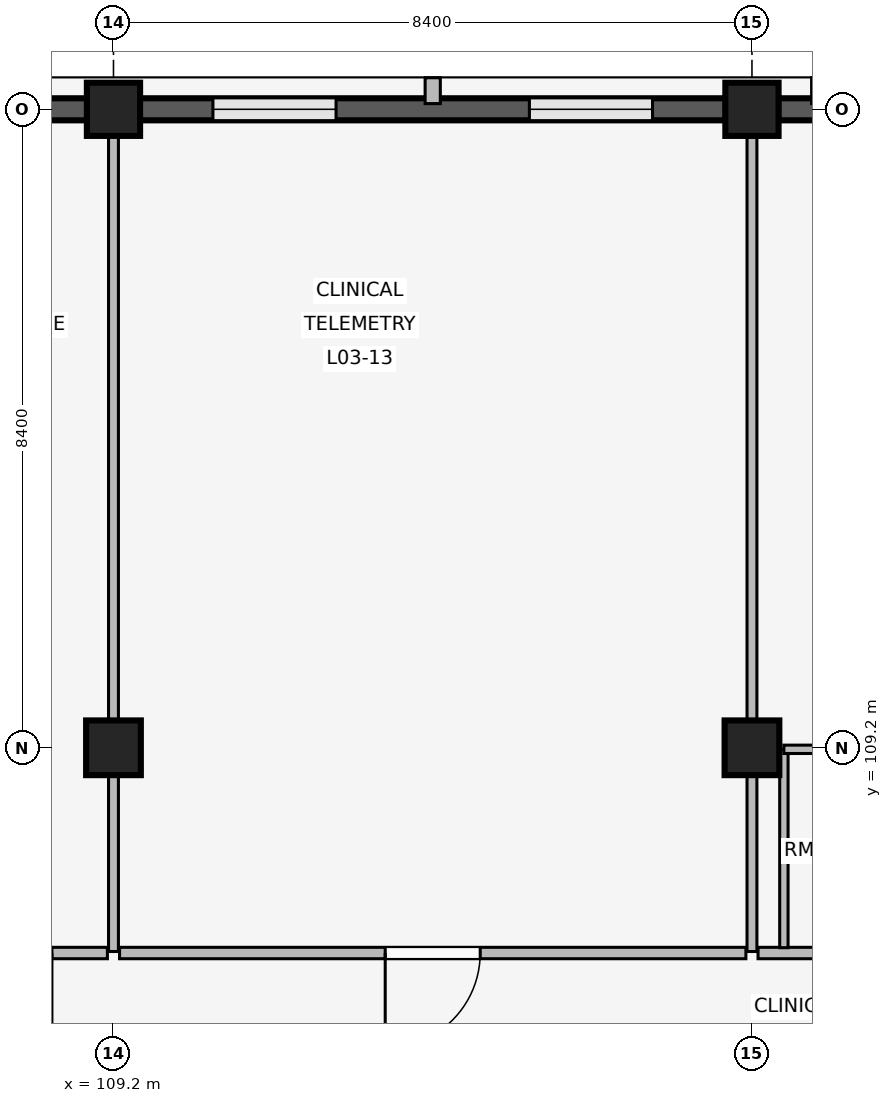
"""IFC4 building model, lengths in metres.
Left out: names, types, materials, properties, quantities, classifications, styles, units other than length and angle.
Written with IfcOpenShell. Run it as: python <this file> out.ifc"""

import sys

from ifc_helpers import new_model, si_unit, direction, frame, frame_2d, origin, origin_2d, place, context, subcontext, project, spatial, rectangle, extrude, element, fill, save


model = new_model("IFC4")
c1 = context("Model", 3, precision=1e-05, world=origin(), true_north=direction((0.0, 1.0)))
c2 = subcontext(c1, "Body", "Model", "MODEL_VIEW")
j1 = project(units=[si_unit("LENGTHUNIT", "METRE"), si_unit("PLANEANGLEUNIT", "RADIAN")], contexts=[c1])
p1 = place(None, origin())
s1 = spatial("IfcSite", under=j1, at=p1, CompositionType="ELEMENT")
p2 = place(p1, origin())
s2 = spatial("IfcBuilding", under=s1, at=p2, CompositionType="ELEMENT")
p3 = place(p2, frame((0.0, 0.0, 12.9)))
s3 = spatial("IfcBuildingStorey", under=s2, at=p3, CompositionType="ELEMENT", Elevation=12.9)
p4 = place(p3, frame((109.2, 109.2, 0.0), z_axis=(0.0, 0.0, 1.0), x_axis=(1.0, 0.0, 0.0)))
e1 = element("IfcColumn", 1, at=p4, inside=s3, PredefinedType="COLUMN", context=c2, shape_type="SweptSolid", body=[
    extrude(rectangle(XDim=0.72, YDim=0.72, at=origin_2d()), origin(), (0.0, 0.0, 1.0), 3.3),
])
p5 = place(p3, frame((109.2, 117.6, 0.0), z_axis=(0.0, 0.0, 1.0), x_axis=(1.0, 0.0, 0.0)))
e2 = element("IfcColumn", 2, at=p5, inside=s3, PredefinedType="COLUMN", context=c2, shape_type="SweptSolid", body=[
    extrude(rectangle(XDim=0.7, YDim=0.7, at=origin_2d()), origin(), (0.0, 0.0, 1.0), 3.3),
])
p6 = place(p3, frame((117.6, 109.2, 0.0), z_axis=(0.0, 0.0, 1.0), x_axis=(1.0, 0.0, 0.0)))
e3 = element("IfcColumn", 3, at=p6, inside=s3, PredefinedType="COLUMN", context=c2, shape_type="SweptSolid", body=[
    extrude(rectangle(XDim=0.72, YDim=0.72, at=origin_2d()), origin(), (0.0, 0.0, 1.0), 3.3),
])
p7 = place(p3, frame((117.6, 117.6, 0.0), z_axis=(0.0, 0.0, 1.0), x_axis=(1.0, 0.0, 0.0)))
e4 = element("IfcColumn", 4, at=p7, inside=s3, PredefinedType="COLUMN", context=c2, shape_type="SweptSolid", body=[
    extrude(rectangle(XDim=0.7, YDim=0.7, at=origin_2d()), origin(), (0.0, 0.0, 1.0), 3.3),
])
p8 = place(p3, frame((101.145, 117.6, 0.0), z_axis=(0.0, 0.0, 1.0), x_axis=(1.0, 0.0, 0.0)))
e5 = element("IfcWall", 5, at=p8, inside=s3, PredefinedType="SOLIDWALL", context=c2, shape_type="SweptSolid", body=[
    extrude(rectangle(XDim=7.71, YDim=0.29, at=frame_2d((3.855, 0.0))), origin(), (0.0, 0.0, 1.0), 2.44),
])
p9 = place(p8, frame((1.043, 0.0, 0.85)))
e6 = element("IfcOpeningElement", 6, at=p9, cuts=e5, PredefinedType="OPENING", context=c2, shape_type="SweptSolid", body=[
    extrude(rectangle(XDim=1.46, YDim=0.85, at=frame_2d((0.73, 0.425))), frame((0.0, 0.155, 0.0), z_axis=(0.0, -1.0, 0.0), x_axis=(1.0, 0.0, 0.0)), (0.0, 0.0, 1.0), 0.31),
])
p10 = place(p8, frame((5.207, 0.0, 0.85)))
e7 = element("IfcOpeningElement", 7, at=p10, cuts=e5, PredefinedType="OPENING", context=c2, shape_type="SweptSolid", body=[
    extrude(rectangle(XDim=1.46, YDim=0.85, at=frame_2d((0.73, 0.425))), frame((0.0, 0.155, 0.0), z_axis=(0.0, -1.0, 0.0), x_axis=(1.0, 0.0, 0.0)), (0.0, 0.0, 1.0), 0.31),
])
p11 = place(p3, frame((109.545, 117.6, 0.0), z_axis=(0.0, 0.0, 1.0), x_axis=(1.0, 0.0, 0.0)))
e8 = element("IfcWall", 8, at=p11, inside=s3, PredefinedType="SOLIDWALL", context=c2, shape_type="SweptSolid", body=[
    extrude(rectangle(XDim=7.71, YDim=0.29, at=frame_2d((3.855, 0.0))), origin(), (0.0, 0.0, 1.0), 2.44),
])
p12 = place(p11, frame((0.963, 0.0, 0.85)))
e9 = element("IfcOpeningElement", 9, at=p12, cuts=e8, PredefinedType="OPENING", context=c2, shape_type="SweptSolid", body=[
    extrude(rectangle(XDim=1.62, YDim=0.95, at=frame_2d((0.81, 0.475))), frame((0.0, 0.155, 0.0), z_axis=(0.0, -1.0, 0.0), x_axis=(1.0, 0.0, 0.0)), (0.0, 0.0, 1.0), 0.31),
])
p13 = place(p11, frame((5.127, 0.0, 0.85)))
e10 = element("IfcOpeningElement", 10, at=p13, cuts=e8, PredefinedType="OPENING", context=c2, shape_type="SweptSolid", body=[
    extrude(rectangle(XDim=1.62, YDim=0.95, at=frame_2d((0.81, 0.475))), frame((0.0, 0.155, 0.0), z_axis=(0.0, -1.0, 0.0), x_axis=(1.0, 0.0, 0.0)), (0.0, 0.0, 1.0), 0.31),
])
p14 = place(p3, frame((113.4, 117.675, 0.0), z_axis=(0.0, 0.0, 1.0), x_axis=(0.0, 1.0, 0.0)))
e11 = element("IfcWall", 11, at=p14, inside=s3, PredefinedType="ELEMENTEDWALL", context=c2, shape_type="SweptSolid", body=[
    extrude(rectangle(XDim=0.34, YDim=0.2, at=frame_2d((0.17, 0.0))), origin(), (0.0, 0.0, 1.0), 2.42),
])
p15 = place(p3, frame((117.945, 117.6, 0.0), z_axis=(0.0, 0.0, 1.0), x_axis=(1.0, 0.0, 0.0)))
e12 = element("IfcWall", 12, at=p15, inside=s3, PredefinedType="SOLIDWALL", context=c2, shape_type="SweptSolid", body=[
    extrude(rectangle(XDim=7.71, YDim=0.29, at=frame_2d((3.855, 0.0))), origin(), (0.0, 0.0, 1.0), 2.44),
])
p16 = place(p15, frame((1.043, 0.0, 0.85)))
e13 = element("IfcOpeningElement", 13, at=p16, cuts=e12, PredefinedType="OPENING", context=c2, shape_type="SweptSolid", body=[
    extrude(rectangle(XDim=1.46, YDim=0.85, at=frame_2d((0.73, 0.425))), frame((0.0, 0.155, 0.0), z_axis=(0.0, -1.0, 0.0), x_axis=(1.0, 0.0, 0.0)), (0.0, 0.0, 1.0), 0.31),
])
p17 = place(p15, frame((5.207, 0.0, 0.85)))
e14 = element("IfcOpeningElement", 14, at=p17, cuts=e12, PredefinedType="OPENING", context=c2, shape_type="SweptSolid", body=[
    extrude(rectangle(XDim=1.46, YDim=0.85, at=frame_2d((0.73, 0.425))), frame((0.0, 0.155, 0.0), z_axis=(0.0, -1.0, 0.0), x_axis=(1.0, 0.0, 0.0)), (0.0, 0.0, 1.0), 0.31),
])
p18 = place(p3, frame((118.485, 117.675, 0.0), z_axis=(0.0, 0.0, 1.0), x_axis=(0.0, 1.0, 0.0)))
e15 = element("IfcWall", 15, at=p18, inside=s3, PredefinedType="ELEMENTEDWALL", context=c2, shape_type="SweptSolid", body=[
    extrude(rectangle(XDim=0.34, YDim=0.2, at=frame_2d((0.17, 0.0))), origin(), (0.0, 0.0, 1.0), 2.42),
])
p19 = place(p3, frame((109.12, 106.5, 0.0), z_axis=(0.0, 0.0, 1.0), x_axis=(-1.0, 0.0, 0.0)))
e16 = element("IfcWall", 16, at=p19, inside=s3, PredefinedType="PARTITIONING", context=c2, shape_type="SweptSolid", body=[
    extrude(rectangle(XDim=8.24, YDim=0.15, at=frame_2d((4.12, 0.0))), origin(), (0.0, 0.0, 1.0), 2.42),
])
p20 = place(p19, frame((0.73, 0.0, 0.0)))
e17 = element("IfcOpeningElement", 17, at=p20, cuts=e16, PredefinedType="OPENING", context=c2, shape_type="SweptSolid", body=[
    extrude(rectangle(XDim=1.32, YDim=2.25, at=frame_2d((0.66, 1.125))), frame((0.0, 0.085, 0.0), z_axis=(0.0, -1.0, 0.0), x_axis=(1.0, 0.0, 0.0)), (0.0, 0.0, 1.0), 0.17),
])
p21 = place(p19, frame((4.43, 0.0, 0.0)))
e18 = element("IfcOpeningElement", 18, at=p21, cuts=e16, PredefinedType="OPENING", context=c2, shape_type="SweptSolid", body=[
    extrude(rectangle(XDim=1.32, YDim=2.25, at=frame_2d((0.66, 1.125))), frame((0.0, 0.085, 0.0), z_axis=(0.0, -1.0, 0.0), x_axis=(1.0, 0.0, 0.0)), (0.0, 0.0, 1.0), 0.17),
])
p22 = place(p3, frame((109.2, 106.52, 0.0), z_axis=(0.0, 0.0, 1.0), x_axis=(0.0, 1.0, 0.0)))
e19 = element("IfcWall", 19, at=p22, inside=s3, PredefinedType="PARTITIONING", context=c2, shape_type="SweptSolid", body=[
    extrude(rectangle(XDim=10.94, YDim=0.13, at=frame_2d((5.47, 0.0))), origin(), (0.0, 0.0, 1.0), 2.42),
])
p23 = place(p3, frame((117.52, 106.5, 0.0), z_axis=(0.0, 0.0, 1.0), x_axis=(-1.0, 0.0, 0.0)))
e20 = element("IfcWall", 20, at=p23, inside=s3, PredefinedType="PARTITIONING", context=c2, shape_type="SweptSolid", body=[
    extrude(rectangle(XDim=8.24, YDim=0.15, at=frame_2d((4.12, 0.0))), origin(), (0.0, 0.0, 1.0), 2.42),
])
p24 = place(p23, frame((3.495, 0.0, 0.0)))
e21 = element("IfcOpeningElement", 21, at=p24, cuts=e20, PredefinedType="OPENING", context=c2, shape_type="SweptSolid", body=[
    extrude(rectangle(XDim=1.25, YDim=2.2, at=frame_2d((0.625, 1.1))), frame((0.0, 0.085, 0.0), z_axis=(0.0, -1.0, 0.0), x_axis=(1.0, 0.0, 0.0)), (0.0, 0.0, 1.0), 0.17),
])
p25 = place(p3, frame((117.6, 106.52, 0.0), z_axis=(0.0, 0.0, 1.0), x_axis=(0.0, 1.0, 0.0)))
e22 = element("IfcWall", 22, at=p25, inside=s3, PredefinedType="PARTITIONING", context=c2, shape_type="SweptSolid", body=[
    extrude(rectangle(XDim=10.94, YDim=0.13, at=frame_2d((5.47, 0.0))), origin(), (0.0, 0.0, 1.0), 2.42),
])
p26 = place(p3, frame((125.92, 106.5, 0.0), z_axis=(0.0, 0.0, 1.0), x_axis=(-1.0, 0.0, 0.0)))
e23 = element("IfcWall", 23, at=p26, inside=s3, PredefinedType="PARTITIONING", context=c2, shape_type="SweptSolid", body=[
    extrude(rectangle(XDim=8.24, YDim=0.15, at=frame_2d((4.12, 0.0))), origin(), (0.0, 0.0, 1.0), 2.42),
])
p27 = place(p26, frame((0.73, 0.0, 0.0)))
e24 = element("IfcOpeningElement", 24, at=p27, cuts=e23, PredefinedType="OPENING", context=c2, shape_type="SweptSolid", body=[
    extrude(rectangle(XDim=1.32, YDim=2.25, at=frame_2d((0.66, 1.125))), frame((0.0, 0.085, 0.0), z_axis=(0.0, -1.0, 0.0), x_axis=(1.0, 0.0, 0.0)), (0.0, 0.0, 1.0), 0.17),
])
p28 = place(p26, frame((4.43, 0.0, 0.0)))
e25 = element("IfcOpeningElement", 25, at=p28, cuts=e23, PredefinedType="OPENING", context=c2, shape_type="SweptSolid", body=[
    extrude(rectangle(XDim=1.32, YDim=2.25, at=frame_2d((0.66, 1.125))), frame((0.0, 0.085, 0.0), z_axis=(0.0, -1.0, 0.0), x_axis=(1.0, 0.0, 0.0)), (0.0, 0.0, 1.0), 0.17),
])
p29 = place(p3, frame((118.02, 106.57, 0.0), z_axis=(0.0, 0.0, 1.0), x_axis=(0.0, 1.0, 0.0)))
e26 = element("IfcWall", 26, at=p29, inside=s3, PredefinedType="PARTITIONING", context=c2, shape_type="SweptSolid", body=[
    extrude(rectangle(XDim=2.61, YDim=0.11, at=frame_2d((1.305, 0.0))), origin(), (0.0, 0.0, 1.0), 2.42),
])
p30 = place(p3, frame((118.02, 109.18, 0.0), z_axis=(0.0, 0.0, 1.0), x_axis=(1.0, 0.0, 0.0)))
e27 = element("IfcWall", 27, at=p30, inside=s3, PredefinedType="PARTITIONING", context=c2, shape_type="SweptSolid", body=[
    extrude(rectangle(XDim=1.98, YDim=0.11, at=frame_2d((0.99, 0.0))), origin(), (0.0, 0.0, 1.0), 2.42),
])
p31 = place(p30, frame((0.54, 0.0, 0.0)))
e28 = element("IfcOpeningElement", 28, at=p31, cuts=e27, PredefinedType="OPENING", context=c2, shape_type="SweptSolid", body=[
    extrude(rectangle(XDim=0.9, YDim=2.1, at=frame_2d((0.45, 1.05))), frame((0.0, 0.065, 0.0), z_axis=(0.0, -1.0, 0.0), x_axis=(1.0, 0.0, 0.0)), (0.0, 0.0, 1.0), 0.13),
])
p32 = place(p12, origin())
e29 = element("IfcWindow", 29, at=p32, inside=s3, PartitioningType="SINGLE_PANEL", PredefinedType="WINDOW", context=c2, shape_type="SweptSolid", body=[
    extrude(rectangle(XDim=1.62, YDim=0.95, at=frame_2d((0.81, 0.475))), frame((0.0, 0.03, 0.0), z_axis=(0.0, -1.0, 0.0), x_axis=(1.0, 0.0, 0.0)), (0.0, 0.0, 1.0), 0.06),
])
fill(e9, e29)
p33 = place(p13, origin())
e30 = element("IfcWindow", 30, at=p33, inside=s3, PartitioningType="SINGLE_PANEL", PredefinedType="WINDOW", context=c2, shape_type="SweptSolid", body=[
    extrude(rectangle(XDim=1.62, YDim=0.95, at=frame_2d((0.81, 0.475))), frame((0.0, 0.03, 0.0), z_axis=(0.0, -1.0, 0.0), x_axis=(1.0, 0.0, 0.0)), (0.0, 0.0, 1.0), 0.06),
])
fill(e10, e30)
p34 = place(p24, origin())
e31 = element("IfcDoor", 31, at=p34, inside=s3, OperationType="SINGLE_SWING_RIGHT", PredefinedType="DOOR", context=c2, shape_type="SweptSolid", body=[
    extrude(rectangle(XDim=1.25, YDim=2.2, at=frame_2d((0.625, 1.1))), frame((0.0, 0.025, 0.0), z_axis=(0.0, -1.0, 0.0), x_axis=(1.0, 0.0, 0.0)), (0.0, 0.0, 1.0), 0.05),
])
fill(e21, e31)
save(model, sys.argv[1])
